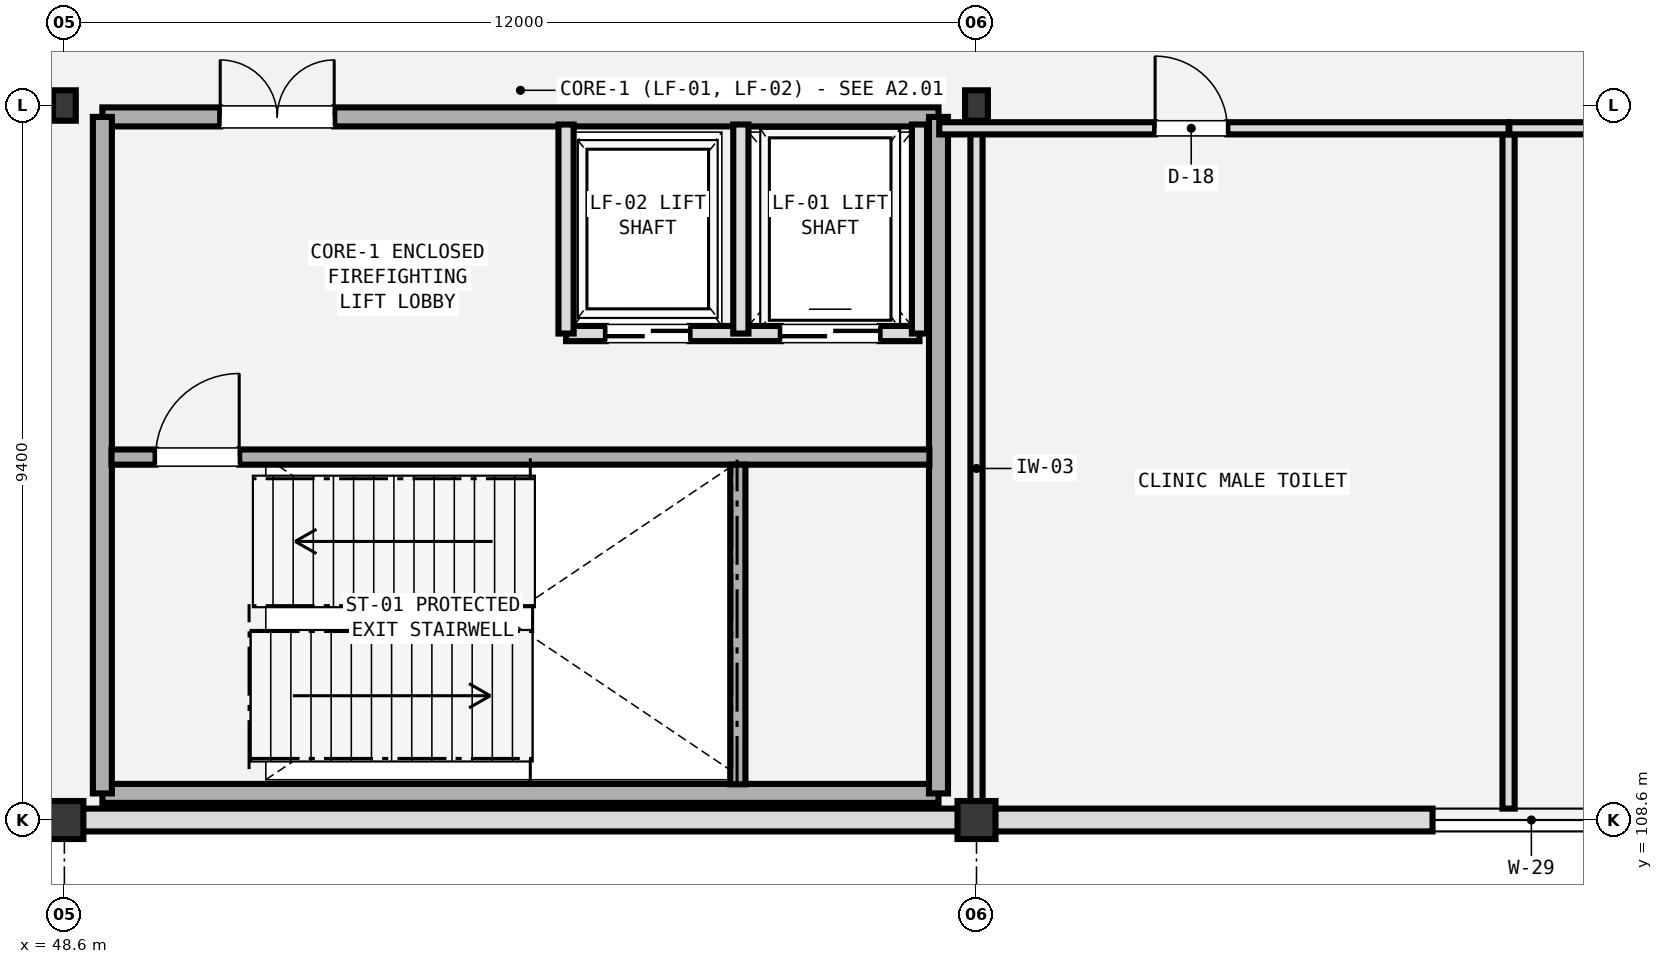
"""IFC4 building model, lengths in metres.
Left out: names, types, materials, properties, quantities, classifications, styles, units other than length and angle.
Written with IfcOpenShell. Run it as: python <this file> out.ifc"""

import sys

from ifc_helpers import new_model, si_unit, direction, frame, frame_2d, origin, origin_2d, place, context, subcontext, project, spatial, rectangle, i_section, extrude, element, fill, save


model = new_model("IFC4")
c1 = context("Model", 3, precision=1e-05, world=origin(), true_north=direction((0.0, 1.0)))
c2 = subcontext(c1, "Body", "Model", "MODEL_VIEW")
j1 = project(units=[si_unit("LENGTHUNIT", "METRE"), si_unit("PLANEANGLEUNIT", "RADIAN")], contexts=[c1])
p1 = place(None, origin())
s1 = spatial("IfcSite", under=j1, at=p1, CompositionType="ELEMENT")
p2 = place(p1, origin())
s2 = spatial("IfcBuilding", under=s1, at=p2, CompositionType="ELEMENT")
p3 = place(p2, frame((0.0, 0.0, 9.6)))
s3 = spatial("IfcBuildingStorey", under=s2, at=p3, CompositionType="ELEMENT", Elevation=9.6)
p4 = place(p3, frame((48.6, 108.6, 0.0), z_axis=(0.0, 0.0, 1.0), x_axis=(1.0, 0.0, 0.0)))
e1 = element("IfcColumn", 1, at=p4, inside=s3, PredefinedType="COLUMN", context=c2, shape_type="SweptSolid", body=[
    extrude(rectangle(XDim=0.5, YDim=0.5, at=origin_2d()), origin(), (0.0, 0.0, 1.0), 4.8),
])
p5 = place(p3, frame((48.6, 118.0, 0.0), z_axis=(0.0, 0.0, 1.0), x_axis=(1.0, 0.0, 0.0)))
e2 = element("IfcColumn", 2, at=p5, inside=s3, PredefinedType="COLUMN", context=c2, shape_type="SweptSolid", body=[
    extrude(i_section(OverallWidth=0.3, OverallDepth=0.4, WebThickness=0.013, FlangeThickness=0.024, FilletRadius=0.027, at=origin_2d()), origin(), (0.0, 0.0, 1.0), 4.8),
])
p6 = place(p3, frame((60.6, 108.6, 0.0), z_axis=(0.0, 0.0, 1.0), x_axis=(1.0, 0.0, 0.0)))
e3 = element("IfcColumn", 3, at=p6, inside=s3, PredefinedType="COLUMN", context=c2, shape_type="SweptSolid", body=[
    extrude(rectangle(XDim=0.5, YDim=0.5, at=origin_2d()), origin(), (0.0, 0.0, 1.0), 4.8),
])
p7 = place(p3, frame((60.6, 118.0, 0.0), z_axis=(0.0, 0.0, 1.0), x_axis=(1.0, 0.0, 0.0)))
e4 = element("IfcColumn", 4, at=p7, inside=s3, PredefinedType="COLUMN", context=c2, shape_type="SweptSolid", body=[
    extrude(i_section(OverallWidth=0.3, OverallDepth=0.4, WebThickness=0.013, FlangeThickness=0.024, FilletRadius=0.027, at=origin_2d()), origin(), (0.0, 0.0, 1.0), 4.8),
])
p8 = place(p3, frame((24.6, 108.6, 0.0), z_axis=(0.0, 0.0, 1.0), x_axis=(1.0, 0.0, 0.0)))
e5 = element("IfcWall", 5, at=p8, inside=s3, PredefinedType="SOLIDWALL", context=c2, shape_type="SweptSolid", body=[
    extrude(rectangle(XDim=95.4, YDim=0.3, at=frame_2d((47.7, 0.0))), origin(), (0.0, 0.0, 1.0), 3.36),
])
p9 = place(p8, frame((88.8, 0.0, 0.0)))
e6 = element("IfcOpeningElement", 6, at=p9, cuts=e5, PredefinedType="OPENING", context=c2, shape_type="SweptSolid", body=[
    extrude(rectangle(XDim=1.6, YDim=2.3, at=frame_2d((0.8, 1.15))), frame((0.0, 0.16, 0.0), z_axis=(0.0, -1.0, 0.0), x_axis=(1.0, 0.0, 0.0)), (0.0, 0.0, 1.0), 0.32),
])
p10 = place(p8, frame((6.0, 0.0, 0.9)))
e7 = element("IfcOpeningElement", 7, at=p10, cuts=e5, PredefinedType="OPENING", context=c2, shape_type="SweptSolid", body=[
    extrude(rectangle(XDim=3.2, YDim=1.2, at=frame_2d((1.6, 0.6))), frame((0.0, 0.16, 0.0), z_axis=(0.0, -1.0, 0.0), x_axis=(1.0, 0.0, 0.0)), (0.0, 0.0, 1.0), 0.32),
])
p11 = place(p8, frame((18.0, 0.0, 0.9)))
e8 = element("IfcOpeningElement", 8, at=p11, cuts=e5, PredefinedType="OPENING", context=c2, shape_type="SweptSolid", body=[
    extrude(rectangle(XDim=2.8, YDim=1.2, at=frame_2d((1.4, 0.6))), frame((0.0, 0.16, 0.0), z_axis=(0.0, -1.0, 0.0), x_axis=(1.0, 0.0, 0.0)), (0.0, 0.0, 1.0), 0.32),
])
p12 = place(p8, frame((42.0, 0.0, 0.9)))
e9 = element("IfcOpeningElement", 9, at=p12, cuts=e5, PredefinedType="OPENING", context=c2, shape_type="SweptSolid", body=[
    extrude(rectangle(XDim=2.6, YDim=1.4, at=frame_2d((1.3, 0.7))), frame((0.0, 0.16, 0.0), z_axis=(0.0, -1.0, 0.0), x_axis=(1.0, 0.0, 0.0)), (0.0, 0.0, 1.0), 0.32),
])
p13 = place(p8, frame((76.0, 0.0, 0.9)))
e10 = element("IfcOpeningElement", 10, at=p13, cuts=e5, PredefinedType="OPENING", context=c2, shape_type="SweptSolid", body=[
    extrude(rectangle(XDim=2.4, YDim=1.65, at=frame_2d((1.2, 0.825))), frame((0.0, 0.16, 0.0), z_axis=(0.0, -1.0, 0.0), x_axis=(1.0, 0.0, 0.0)), (0.0, 0.0, 1.0), 0.32),
])
p14 = place(p2, frame((0.0, 0.0, 5.4)))
s4 = spatial("IfcBuildingStorey", under=s2, at=p14, CompositionType="ELEMENT", Elevation=5.4)
p15 = place(p14, frame((60.6, 85.4, 4.88), z_axis=(0.0, 0.0, 1.0), x_axis=(0.0, 1.0, 0.0)))
e11 = element("IfcWall", 11, at=p15, inside=s4, PredefinedType="PARAPET", context=c2, shape_type="SweptSolid", body=[
    extrude(rectangle(XDim=23.2, YDim=0.25, at=frame_2d((11.6, 0.0))), origin(), (0.0, 0.0, 1.0), 1.15),
])
p16 = place(p3, frame((49.1, 108.95, 0.0), z_axis=(0.0, 0.0, 1.0), x_axis=(1.0, 0.0, 0.0)))
e12 = element("IfcWall", 12, at=p16, inside=s3, PredefinedType="SHEAR", context=c2, shape_type="SweptSolid", body=[
    extrude(rectangle(XDim=11.0, YDim=0.25, at=frame_2d((5.5, 0.0))), origin(), (0.0, 0.0, 1.0), 4.48),
])
p17 = place(p3, frame((49.1, 117.85, 0.0), z_axis=(0.0, 0.0, 1.0), x_axis=(1.0, 0.0, 0.0)))
e13 = element("IfcWall", 13, at=p17, inside=s3, PredefinedType="SHEAR", context=c2, shape_type="SweptSolid", body=[
    extrude(rectangle(XDim=11.0, YDim=0.25, at=frame_2d((5.5, 0.0))), origin(), (0.0, 0.0, 1.0), 4.48),
])
p18 = place(p17, frame((1.55, 0.0, 0.0)))
e14 = element("IfcOpeningElement", 14, at=p18, cuts=e13, PredefinedType="OPENING", context=c2, shape_type="SweptSolid", body=[
    extrude(rectangle(XDim=1.5, YDim=2.2, at=frame_2d((0.75, 1.1))), frame((0.0, 0.135, 0.0), z_axis=(0.0, -1.0, 0.0), x_axis=(1.0, 0.0, 0.0)), (0.0, 0.0, 1.0), 0.27),
])
for number, where, z_axis, x_axis in (
    (15, (49.1, 108.95, 0.0), (0.0, 0.0, 1.0), (0.0, 1.0, 0.0)),
    (16, (60.1, 108.95, 0.0), (0.0, 0.0, 1.0), (0.0, 1.0, 0.0)),
):
    element("IfcWall", number, at=place(p3, frame(where, z_axis=z_axis, x_axis=x_axis)), inside=s3, PredefinedType="SHEAR", context=c2, shape_type="SweptSolid", body=[
        extrude(rectangle(XDim=8.9, YDim=0.25, at=frame_2d((4.45, 0.0))), origin(), (0.0, 0.0, 1.0), 4.48),
    ])
p19 = place(p3, frame((49.22, 113.375, 0.0), z_axis=(0.0, 0.0, 1.0), x_axis=(1.0, 0.0, 0.0)))
e17 = element("IfcWall", 17, at=p19, inside=s3, PredefinedType="SHEAR", context=c2, shape_type="SweptSolid", body=[
    extrude(rectangle(XDim=10.76, YDim=0.2, at=frame_2d((5.38, 0.0))), origin(), (0.0, 0.0, 1.0), 4.48),
])
p20 = place(p19, frame((0.58, 0.0, 0.0)))
e18 = element("IfcOpeningElement", 18, at=p20, cuts=e17, PredefinedType="OPENING", context=c2, shape_type="SweptSolid", body=[
    extrude(rectangle(XDim=1.1, YDim=2.2, at=frame_2d((0.55, 1.1))), frame((0.0, 0.11, 0.0), z_axis=(0.0, -1.0, 0.0), x_axis=(1.0, 0.0, 0.0)), (0.0, 0.0, 1.0), 0.22),
])
p21 = place(p3, frame((57.46, 109.07, 0.0), z_axis=(0.0, 0.0, 1.0), x_axis=(0.0, 1.0, 0.0)))
e19 = element("IfcWall", 19, at=p21, inside=s3, PredefinedType="SHEAR", context=c2, shape_type="SweptSolid", body=[
    extrude(rectangle(XDim=4.205, YDim=0.2, at=frame_2d((2.103, 0.0))), origin(), (0.0, 0.0, 1.0), 4.48),
])
p22 = place(p3, frame((55.2, 115.0, 0.0), z_axis=(0.0, 0.0, 1.0), x_axis=(1.0, 0.0, 0.0)))
e20 = element("IfcWall", 20, at=p22, inside=s3, PredefinedType="SOLIDWALL", context=c2, shape_type="SweptSolid", body=[
    extrude(rectangle(XDim=4.65, YDim=0.2, at=frame_2d((2.325, 0.0))), origin(), (0.0, 0.0, 1.0), 4.15),
])
p23 = place(p22, frame((2.825, 0.0, 0.0)))
e21 = element("IfcOpeningElement", 21, at=p23, cuts=e20, PredefinedType="OPENING", context=c2, shape_type="SweptSolid", body=[
    extrude(rectangle(XDim=1.3, YDim=2.3, at=frame_2d((0.65, 1.15))), frame((0.0, 0.11, 0.0), z_axis=(0.0, -1.0, 0.0), x_axis=(1.0, 0.0, 0.0)), (0.0, 0.0, 1.0), 0.22),
])
p24 = place(p22, frame((0.525, 0.0, 0.0)))
e22 = element("IfcOpeningElement", 22, at=p24, cuts=e20, PredefinedType="OPENING", context=c2, shape_type="SweptSolid", body=[
    extrude(rectangle(XDim=1.1, YDim=2.2, at=frame_2d((0.55, 1.1))), frame((0.0, 0.11, 0.0), z_axis=(0.0, -1.0, 0.0), x_axis=(1.0, 0.0, 0.0)), (0.0, 0.0, 1.0), 0.22),
])
for number, where, z_axis, x_axis in (
    (23, (57.5, 115.0, 0.0), (0.0, 0.0, 1.0), (0.0, 1.0, 0.0)),
    (24, (59.85, 115.0, 0.0), (0.0, 0.0, 1.0), (0.0, 1.0, 0.0)),
    (25, (55.2, 115.0, 0.0), (0.0, 0.0, 1.0), (0.0, 1.0, 0.0)),
):
    element("IfcWall", number, at=place(p3, frame(where, z_axis=z_axis, x_axis=x_axis)), inside=s3, PredefinedType="SOLIDWALL", context=c2, shape_type="SweptSolid", body=[
        extrude(rectangle(XDim=2.75, YDim=0.2, at=frame_2d((1.375, 0.0))), origin(), (0.0, 0.0, 1.0), 4.48),
    ])
for number, where, z_axis, x_axis in (
    (26, (60.6, 108.75, 0.0), (0.0, 0.0, 1.0), (0.0, 1.0, 0.0)),
    (27, (67.6, 108.75, 0.0), (0.0, 0.0, 1.0), (0.0, 1.0, 0.0)),
):
    element("IfcWall", number, at=place(p3, frame(where, z_axis=z_axis, x_axis=x_axis)), inside=s3, PredefinedType="PLUMBINGWALL", context=c2, shape_type="SweptSolid", body=[
        extrude(rectangle(XDim=8.95, YDim=0.16, at=frame_2d((4.475, 0.0))), origin(), (0.0, 0.0, 1.0), 3.3),
    ])
p25 = place(p3, frame((60.11, 117.7, 0.0), z_axis=(0.0, 0.0, 1.0), x_axis=(1.0, 0.0, 0.0)))
e28 = element("IfcWall", 28, at=p25, inside=s3, PredefinedType="PLUMBINGWALL", context=c2, shape_type="SweptSolid", body=[
    extrude(rectangle(XDim=7.49, YDim=0.16, at=frame_2d((3.745, 0.0))), origin(), (0.0, 0.0, 1.0), 3.3),
])
p26 = place(p25, frame((2.84, 0.0, 0.0)))
e29 = element("IfcOpeningElement", 29, at=p26, cuts=e28, PredefinedType="OPENING", context=c2, shape_type="SweptSolid", body=[
    extrude(rectangle(XDim=0.95, YDim=2.15, at=frame_2d((0.475, 1.075))), frame((0.0, 0.09, 0.0), z_axis=(0.0, -1.0, 0.0), x_axis=(1.0, 0.0, 0.0)), (0.0, 0.0, 1.0), 0.18),
])
p27 = place(p3, frame((67.61, 117.7, 0.0), z_axis=(0.0, 0.0, 1.0), x_axis=(1.0, 0.0, 0.0)))
e30 = element("IfcWall", 30, at=p27, inside=s3, PredefinedType="PLUMBINGWALL", context=c2, shape_type="SweptSolid", body=[
    extrude(rectangle(XDim=7.39, YDim=0.16, at=frame_2d((3.695, 0.0))), origin(), (0.0, 0.0, 1.0), 3.3),
])
p28 = place(p27, frame((2.99, 0.0, 0.0)))
e31 = element("IfcOpeningElement", 31, at=p28, cuts=e30, PredefinedType="OPENING", context=c2, shape_type="SweptSolid", body=[
    extrude(rectangle(XDim=0.95, YDim=2.15, at=frame_2d((0.475, 1.075))), frame((0.0, 0.09, 0.0), z_axis=(0.0, -1.0, 0.0), x_axis=(1.0, 0.0, 0.0)), (0.0, 0.0, 1.0), 0.18),
])
p29 = place(p12, frame((2.6, 0.0, 0.0), z_axis=(0.0, 0.0, 1.0), x_axis=(-1.0, 0.0, 0.0)))
e32 = element("IfcWindow", 32, at=p29, inside=s3, PartitioningType="DOUBLE_PANEL_VERTICAL", PredefinedType="WINDOW", context=c2, shape_type="SweptSolid", body=[
    extrude(rectangle(XDim=2.6, YDim=1.4, at=frame_2d((1.3, 0.7))), frame((0.0, 0.03, 0.0), z_axis=(0.0, -1.0, 0.0), x_axis=(1.0, 0.0, 0.0)), (0.0, 0.0, 1.0), 0.06),
])
fill(e9, e32)
p30 = place(p18, origin())
e33 = element("IfcDoor", 33, at=p30, inside=s3, OperationType="DOUBLE_DOOR_SINGLE_SWING", PredefinedType="DOOR", context=c2, shape_type="SweptSolid", body=[
    extrude(rectangle(XDim=1.5, YDim=2.2, at=frame_2d((0.75, 1.1))), frame((0.0, 0.025, 0.0), z_axis=(0.0, -1.0, 0.0), x_axis=(1.0, 0.0, 0.0)), (0.0, 0.0, 1.0), 0.05),
])
fill(e14, e33)
p31 = place(p20, origin())
e34 = element("IfcDoor", 34, at=p31, inside=s3, OperationType="SINGLE_SWING_RIGHT", PredefinedType="DOOR", context=c2, shape_type="SweptSolid", body=[
    extrude(rectangle(XDim=1.1, YDim=2.2, at=frame_2d((0.55, 1.1))), frame((0.0, 0.025, 0.0), z_axis=(0.0, -1.0, 0.0), x_axis=(1.0, 0.0, 0.0)), (0.0, 0.0, 1.0), 0.05),
])
fill(e18, e34)
p32 = place(p23, frame((1.3, 0.0, 0.0), z_axis=(0.0, 0.0, 1.0), x_axis=(-1.0, 0.0, 0.0)))
e35 = element("IfcDoor", 35, at=p32, inside=s3, OperationType="DOUBLE_DOOR_SLIDING", PredefinedType="DOOR", context=c2, shape_type="SweptSolid", body=[
    extrude(rectangle(XDim=1.3, YDim=2.3, at=frame_2d((0.65, 1.15))), frame((0.0, 0.025, 0.0), z_axis=(0.0, -1.0, 0.0), x_axis=(1.0, 0.0, 0.0)), (0.0, 0.0, 1.0), 0.05),
])
fill(e21, e35)
p33 = place(p24, frame((1.1, 0.0, 0.0), z_axis=(0.0, 0.0, 1.0), x_axis=(-1.0, 0.0, 0.0)))
e36 = element("IfcDoor", 36, at=p33, inside=s3, OperationType="DOUBLE_DOOR_SLIDING", PredefinedType="DOOR", context=c2, shape_type="SweptSolid", body=[
    extrude(rectangle(XDim=1.1, YDim=2.2, at=frame_2d((0.55, 1.1))), frame((0.0, 0.025, 0.0), z_axis=(0.0, -1.0, 0.0), x_axis=(1.0, 0.0, 0.0)), (0.0, 0.0, 1.0), 0.05),
])
fill(e22, e36)
p34 = place(p26, origin())
e37 = element("IfcDoor", 37, at=p34, inside=s3, OperationType="SINGLE_SWING_LEFT", PredefinedType="DOOR", context=c2, shape_type="SweptSolid", body=[
    extrude(rectangle(XDim=0.95, YDim=2.15, at=frame_2d((0.475, 1.075))), frame((0.0, 0.025, 0.0), z_axis=(0.0, -1.0, 0.0), x_axis=(1.0, 0.0, 0.0)), (0.0, 0.0, 1.0), 0.05),
])
fill(e29, e37)
save(model, sys.argv[1])
